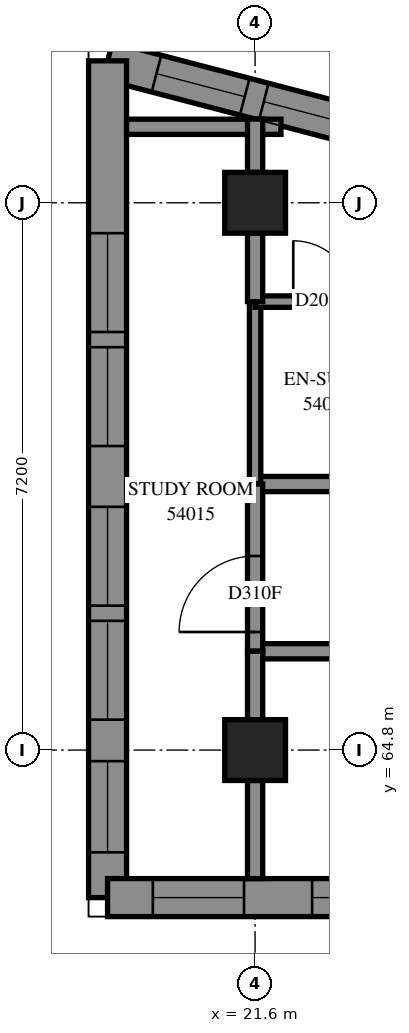
"""IFC4 building model, lengths in metres.
Left out: names, types, materials, properties, quantities, classifications, styles, units other than length and angle.
Written with IfcOpenShell. Run it as: python <this file> out.ifc"""

import sys

from ifc_helpers import new_model, si_unit, direction, frame, frame_2d, origin, origin_2d, place, context, subcontext, project, spatial, polyline, rectangle, outline, extrude, element, fill, save


model = new_model("IFC4")
c1 = context("Model", 3, precision=1e-05, world=origin(), true_north=direction((0.0, 1.0)))
c2 = subcontext(c1, "Body", "Model", "MODEL_VIEW")
j1 = project(units=[si_unit("LENGTHUNIT", "METRE"), si_unit("PLANEANGLEUNIT", "RADIAN")], contexts=[c1])
p1 = place(None, origin())
s1 = spatial("IfcSite", under=j1, at=p1, CompositionType="ELEMENT")
p2 = place(p1, origin())
s2 = spatial("IfcBuilding", under=s1, at=p2, CompositionType="ELEMENT")
p3 = place(p2, frame((0.0, 0.0, 199.8)))
s3 = spatial("IfcBuildingStorey", under=s2, at=p3, CompositionType="ELEMENT", Elevation=199.8)
for number, where, z_axis, x_axis in (
    (1, (21.6, 64.8, 0.0), (0.0, 0.0, 1.0), (1.0, 0.0, 0.0)),
    (2, (21.6, 72.0, 0.0), (0.0, 0.0, 1.0), (1.0, 0.0, 0.0)),
):
    element("IfcColumn", number, at=place(p3, frame(where, z_axis=z_axis, x_axis=x_axis)), inside=s3, PredefinedType="COLUMN", context=c2, shape_type="SweptSolid", body=[
        extrude(rectangle(XDim=0.8, YDim=0.8, at=origin_2d()), origin(), (0.0, 0.0, 1.0), 3.1),
    ])
p4 = place(p3, frame((23.183, 72.947, 0.0), z_axis=(0.0, 0.0, 1.0), x_axis=(-0.9675355908, 0.2527348026, 0.0)))
e3 = element("IfcWall", 3, at=p4, inside=s3, PredefinedType="SOLIDWALL", context=c2, shape_type="SweptSolid", body=[
    extrude(outline(polyline([(0.045, -0.25), (3.966, -0.25), (3.319, 0.25), (-0.045, 0.25), (0.045, -0.25)])), origin(), (0.0, 0.0, 1.0), 3.1),
])
p5 = place(p4, frame((0.318, 0.0, 0.45)))
e4 = element("IfcOpeningElement", 4, at=p5, cuts=e3, PredefinedType="OPENING", context=c2, shape_type="SweptSolid", body=[
    extrude(rectangle(XDim=1.2, YDim=2.5, at=frame_2d((0.6, 1.25))), frame((0.0, 0.26, 0.0), z_axis=(0.0, -1.0, 0.0), x_axis=(1.0, 0.0, 0.0)), (0.0, 0.0, 1.0), 0.52),
])
p6 = place(p4, frame((1.778, 0.0, 0.45)))
e5 = element("IfcOpeningElement", 5, at=p6, cuts=e3, PredefinedType="OPENING", context=c2, shape_type="SweptSolid", body=[
    extrude(rectangle(XDim=1.2, YDim=2.5, at=frame_2d((0.6, 1.25))), frame((0.0, 0.26, 0.0), z_axis=(0.0, -1.0, 0.0), x_axis=(1.0, 0.0, 0.0)), (0.0, 0.0, 1.0), 0.52),
])
p7 = place(p3, frame((19.659, 73.867, 0.0), z_axis=(0.0, 0.0, 1.0), x_axis=(0.0, -1.0, 0.0)))
e6 = element("IfcWall", 6, at=p7, inside=s3, PredefinedType="SOLIDWALL", context=c2, shape_type="SweptSolid", body=[
    extrude(outline(polyline([(-0.324, -0.25), (11.258, -0.25), (10.758, 0.25), (0.324, 0.25), (-0.324, -0.25)])), origin(), (0.0, 0.0, 1.0), 3.1),
])
p8 = place(p7, frame((2.267, 0.0, 0.45)))
e7 = element("IfcOpeningElement", 7, at=p8, cuts=e6, PredefinedType="OPENING", context=c2, shape_type="SweptSolid", body=[
    extrude(rectangle(XDim=1.3, YDim=2.5, at=frame_2d((0.65, 1.25))), frame((0.0, 0.26, 0.0), z_axis=(0.0, -1.0, 0.0), x_axis=(1.0, 0.0, 0.0)), (0.0, 0.0, 1.0), 0.52),
])
p9 = place(p7, frame((3.767, 0.0, 0.45)))
e8 = element("IfcOpeningElement", 8, at=p9, cuts=e6, PredefinedType="OPENING", context=c2, shape_type="SweptSolid", body=[
    extrude(rectangle(XDim=1.3, YDim=2.5, at=frame_2d((0.65, 1.25))), frame((0.0, 0.26, 0.0), z_axis=(0.0, -1.0, 0.0), x_axis=(1.0, 0.0, 0.0)), (0.0, 0.0, 1.0), 0.52),
])
p10 = place(p7, frame((5.867, 0.0, 0.45)))
e9 = element("IfcOpeningElement", 9, at=p10, cuts=e6, PredefinedType="OPENING", context=c2, shape_type="SweptSolid", body=[
    extrude(rectangle(XDim=1.3, YDim=2.5, at=frame_2d((0.65, 1.25))), frame((0.0, 0.26, 0.0), z_axis=(0.0, -1.0, 0.0), x_axis=(1.0, 0.0, 0.0)), (0.0, 0.0, 1.0), 0.52),
])
p11 = place(p7, frame((7.367, 0.0, 0.45)))
e10 = element("IfcOpeningElement", 10, at=p11, cuts=e6, PredefinedType="OPENING", context=c2, shape_type="SweptSolid", body=[
    extrude(rectangle(XDim=1.3, YDim=2.5, at=frame_2d((0.65, 1.25))), frame((0.0, 0.26, 0.0), z_axis=(0.0, -1.0, 0.0), x_axis=(1.0, 0.0, 0.0)), (0.0, 0.0, 1.0), 0.52),
])
p12 = place(p7, frame((9.213, 0.0, 0.45)))
e11 = element("IfcOpeningElement", 11, at=p12, cuts=e6, PredefinedType="OPENING", context=c2, shape_type="SweptSolid", body=[
    extrude(rectangle(XDim=1.2, YDim=2.5, at=frame_2d((0.6, 1.25))), frame((0.0, 0.26, 0.0), z_axis=(0.0, -1.0, 0.0), x_axis=(1.0, 0.0, 0.0)), (0.0, 0.0, 1.0), 0.52),
])
p13 = place(p3, frame((19.659, 62.859, 0.0), z_axis=(0.0, 0.0, 1.0), x_axis=(1.0, 0.0, 0.0)))
e12 = element("IfcWall", 12, at=p13, inside=s3, PredefinedType="SOLIDWALL", context=c2, shape_type="SweptSolid", body=[
    extrude(outline(polyline([(-0.25, -0.25), (15.141, -0.25), (15.641, 0.25), (0.25, 0.25), (-0.25, -0.25)])), origin(), (0.0, 0.0, 1.0), 2.6),
])
p14 = place(p13, frame((2.691, 0.0, 0.6)))
e13 = element("IfcOpeningElement", 13, at=p14, cuts=e12, PredefinedType="OPENING", context=c2, shape_type="SweptSolid", body=[
    extrude(rectangle(XDim=1.8, YDim=1.9, at=frame_2d((0.9, 0.95))), frame((0.0, 0.26, 0.0), z_axis=(0.0, -1.0, 0.0), x_axis=(1.0, 0.0, 0.0)), (0.0, 0.0, 1.0), 0.52),
])
p15 = place(p13, frame((6.441, 0.0, 0.6)))
e14 = element("IfcOpeningElement", 14, at=p15, cuts=e12, PredefinedType="OPENING", context=c2, shape_type="SweptSolid", body=[
    extrude(rectangle(XDim=1.8, YDim=1.9, at=frame_2d((0.9, 0.95))), frame((0.0, 0.26, 0.0), z_axis=(0.0, -1.0, 0.0), x_axis=(1.0, 0.0, 0.0)), (0.0, 0.0, 1.0), 0.52),
])
p16 = place(p13, frame((10.041, 0.0, 0.6)))
e15 = element("IfcOpeningElement", 15, at=p16, cuts=e12, PredefinedType="OPENING", context=c2, shape_type="SweptSolid", body=[
    extrude(rectangle(XDim=1.8, YDim=1.9, at=frame_2d((0.9, 0.95))), frame((0.0, 0.26, 0.0), z_axis=(0.0, -1.0, 0.0), x_axis=(1.0, 0.0, 0.0)), (0.0, 0.0, 1.0), 0.52),
])
p17 = place(p13, frame((13.066, 0.0, 0.6)))
e16 = element("IfcOpeningElement", 16, at=p17, cuts=e12, PredefinedType="OPENING", context=c2, shape_type="SweptSolid", body=[
    extrude(rectangle(XDim=1.8, YDim=1.9, at=frame_2d((0.9, 0.95))), frame((0.0, 0.26, 0.0), z_axis=(0.0, -1.0, 0.0), x_axis=(1.0, 0.0, 0.0)), (0.0, 0.0, 1.0), 0.52),
])
p18 = place(p13, frame((0.596, 0.0, 0.6)))
e17 = element("IfcOpeningElement", 17, at=p18, cuts=e12, PredefinedType="OPENING", context=c2, shape_type="SweptSolid", body=[
    extrude(rectangle(XDim=1.2, YDim=1.9, at=frame_2d((0.6, 0.95))), frame((0.0, 0.26, 0.0), z_axis=(0.0, -1.0, 0.0), x_axis=(1.0, 0.0, 0.0)), (0.0, 0.0, 1.0), 0.52),
])
p19 = place(p3, frame((21.6, 68.3, 0.0), z_axis=(0.0, 0.0, 1.0), x_axis=(1.0, 0.0, 0.0)))
e18 = element("IfcWall", 18, at=p19, inside=s3, PredefinedType="PARTITIONING", context=c2, shape_type="SweptSolid", body=[
    extrude(rectangle(XDim=19.1, YDim=0.2, at=frame_2d((9.55, 0.0))), origin(), (0.0, 0.0, 1.0), 3.1),
])
p20 = place(p19, frame((2.3, 0.0, 0.0)))
e19 = element("IfcOpeningElement", 19, at=p20, cuts=e18, PredefinedType="OPENING", context=c2, shape_type="SweptSolid", body=[
    extrude(rectangle(XDim=0.9, YDim=2.1, at=frame_2d((0.45, 1.05))), frame((0.0, 0.11, 0.0), z_axis=(0.0, -1.0, 0.0), x_axis=(1.0, 0.0, 0.0)), (0.0, 0.0, 1.0), 0.22),
])
p21 = place(p19, frame((5.901, 0.0, 0.0)))
e20 = element("IfcOpeningElement", 20, at=p21, cuts=e18, PredefinedType="OPENING", context=c2, shape_type="SweptSolid", body=[
    extrude(rectangle(XDim=0.9, YDim=2.1, at=frame_2d((0.45, 1.05))), frame((0.0, 0.11, 0.0), z_axis=(0.0, -1.0, 0.0), x_axis=(1.0, 0.0, 0.0)), (0.0, 0.0, 1.0), 0.22),
])
p22 = place(p19, frame((13.139, 0.0, 0.0)))
e21 = element("IfcOpeningElement", 21, at=p22, cuts=e18, PredefinedType="OPENING", context=c2, shape_type="SweptSolid", body=[
    extrude(rectangle(XDim=0.9, YDim=2.1, at=frame_2d((0.45, 1.05))), frame((0.0, 0.11, 0.0), z_axis=(0.0, -1.0, 0.0), x_axis=(1.0, 0.0, 0.0)), (0.0, 0.0, 1.0), 0.22),
])
p23 = place(p3, frame((21.6, 66.1, 0.0), z_axis=(0.0, 0.0, 1.0), x_axis=(1.0, 0.0, 0.0)))
e22 = element("IfcWall", 22, at=p23, inside=s3, PredefinedType="PARTITIONING", context=c2, shape_type="SweptSolid", body=[
    extrude(rectangle(XDim=16.9, YDim=0.2, at=frame_2d((8.45, 0.0))), origin(), (0.0, 0.0, 1.0), 3.1),
])
p24 = place(p23, frame((12.493, 0.0, 0.0)))
e23 = element("IfcOpeningElement", 23, at=p24, cuts=e22, PredefinedType="OPENING", context=c2, shape_type="SweptSolid", body=[
    extrude(rectangle(XDim=1.0, YDim=2.1, at=frame_2d((0.5, 1.05))), frame((0.0, 0.11, 0.0), z_axis=(0.0, -1.0, 0.0), x_axis=(1.0, 0.0, 0.0)), (0.0, 0.0, 1.0), 0.22),
])
p25 = place(p3, frame((21.6, 68.3, 0.0), z_axis=(0.0, 0.0, 1.0), x_axis=(0.0, 1.0, 0.0)))
e24 = element("IfcWall", 24, at=p25, inside=s3, PredefinedType="PARTITIONING", context=c2, shape_type="SweptSolid", body=[
    extrude(rectangle(XDim=2.4, YDim=0.15, at=frame_2d((1.2, 0.0))), origin(), (0.0, 0.0, 1.0), 2.6),
])
p26 = place(p3, frame((21.6, 66.1, 0.0), z_axis=(0.0, 0.0, 1.0), x_axis=(0.0, 1.0, 0.0)))
e25 = element("IfcWall", 25, at=p26, inside=s3, PredefinedType="PARTITIONING", context=c2, shape_type="SweptSolid", body=[
    extrude(rectangle(XDim=2.2, YDim=0.2, at=frame_2d((1.1, 0.0))), origin(), (0.0, 0.0, 1.0), 2.6),
])
p27 = place(p26, frame((0.253, 0.0, 0.0)))
e26 = element("IfcOpeningElement", 26, at=p27, cuts=e25, PredefinedType="OPENING", context=c2, shape_type="SweptSolid", body=[
    extrude(rectangle(XDim=1.0, YDim=2.1, at=frame_2d((0.5, 1.05))), frame((0.0, 0.11, 0.0), z_axis=(0.0, -1.0, 0.0), x_axis=(1.0, 0.0, 0.0)), (0.0, 0.0, 1.0), 0.22),
])
p28 = place(p3, frame((19.909, 73.0, 0.0), z_axis=(0.0, 0.0, 1.0), x_axis=(1.0, 0.0, 0.0)))
e27 = element("IfcWall", 27, at=p28, inside=s3, PredefinedType="PARTITIONING", context=c2, shape_type="SweptSolid", body=[
    extrude(rectangle(XDim=2.031, YDim=0.2, at=frame_2d((1.016, 0.0))), origin(), (0.0, 0.0, 1.0), 3.1),
])
p29 = place(p3, frame((21.6, 70.7, 0.0), z_axis=(0.0, 0.0, 1.0), x_axis=(1.0, 0.0, 0.0)))
e28 = element("IfcWall", 28, at=p29, inside=s3, PredefinedType="PARTITIONING", context=c2, shape_type="SweptSolid", body=[
    extrude(rectangle(XDim=1.9, YDim=0.15, at=frame_2d((0.95, 0.0))), origin(), (0.0, 0.0, 1.0), 3.1),
])
p30 = place(p29, frame((0.502, 0.0, 0.0)))
e29 = element("IfcOpeningElement", 29, at=p30, cuts=e28, PredefinedType="OPENING", context=c2, shape_type="SweptSolid", body=[
    extrude(rectangle(XDim=0.8, YDim=2.1, at=frame_2d((0.4, 1.05))), frame((0.0, 0.085, 0.0), z_axis=(0.0, -1.0, 0.0), x_axis=(1.0, 0.0, 0.0)), (0.0, 0.0, 1.0), 0.17),
])
p31 = place(p3, frame((21.6, 63.109, 0.0), z_axis=(0.0, 0.0, 1.0), x_axis=(0.0, 1.0, 0.0)))
e30 = element("IfcWall", 30, at=p31, inside=s3, PredefinedType="PARTITIONING", context=c2, shape_type="SweptSolid", body=[
    extrude(rectangle(XDim=1.291, YDim=0.2, at=frame_2d((0.645, 0.0))), origin(), (0.0, 0.0, 1.0), 3.1),
])
for number, where, z_axis, x_axis in (
    (31, (21.6, 65.2, 0.0), (0.0, 0.0, 1.0), (0.0, 1.0, 0.0)),
    (32, (21.6, 70.7, 0.0), (0.0, 0.0, 1.0), (0.0, 1.0, 0.0)),
):
    element("IfcWall", number, at=place(p3, frame(where, z_axis=z_axis, x_axis=x_axis)), inside=s3, PredefinedType="PARTITIONING", context=c2, shape_type="SweptSolid", body=[
        extrude(rectangle(XDim=0.9, YDim=0.2, at=frame_2d((0.45, 0.0))), origin(), (0.0, 0.0, 1.0), 2.6),
    ])
p32 = place(p3, frame((21.6, 72.4, 0.0), z_axis=(0.0, 0.0, 1.0), x_axis=(0.0, 1.0, 0.0)))
e33 = element("IfcWall", 33, at=p32, inside=s3, PredefinedType="PARTITIONING", context=c2, shape_type="SweptSolid", body=[
    extrude(rectangle(XDim=0.702, YDim=0.2, at=frame_2d((0.351, 0.0))), origin(), (0.0, 0.0, 1.0), 3.1),
])
p33 = place(p5, origin())
e34 = element("IfcWindow", 34, at=p33, inside=s3, PartitioningType="SINGLE_PANEL", PredefinedType="WINDOW", context=c2, shape_type="SweptSolid", body=[
    extrude(rectangle(XDim=1.2, YDim=2.5, at=frame_2d((0.6, 1.25))), frame((0.0, 0.13, 0.0), z_axis=(0.0, -1.0, 0.0), x_axis=(1.0, 0.0, 0.0)), (0.0, 0.0, 1.0), 0.06),
])
fill(e4, e34)
p34 = place(p6, origin())
e35 = element("IfcWindow", 35, at=p34, inside=s3, PartitioningType="SINGLE_PANEL", PredefinedType="WINDOW", context=c2, shape_type="SweptSolid", body=[
    extrude(rectangle(XDim=1.2, YDim=2.5, at=frame_2d((0.6, 1.25))), frame((0.0, 0.18, 0.0), z_axis=(0.0, -1.0, 0.0), x_axis=(1.0, 0.0, 0.0)), (0.0, 0.0, 1.0), 0.06),
])
fill(e5, e35)
p35 = place(p8, origin())
e36 = element("IfcWindow", 36, at=p35, inside=s3, PartitioningType="SINGLE_PANEL", PredefinedType="WINDOW", context=c2, shape_type="SweptSolid", body=[
    extrude(rectangle(XDim=1.3, YDim=2.5, at=frame_2d((0.65, 1.25))), frame((0.0, 0.18, 0.0), z_axis=(0.0, -1.0, 0.0), x_axis=(1.0, 0.0, 0.0)), (0.0, 0.0, 1.0), 0.06),
])
fill(e7, e36)
p36 = place(p9, origin())
e37 = element("IfcWindow", 37, at=p36, inside=s3, PartitioningType="SINGLE_PANEL", PredefinedType="WINDOW", context=c2, shape_type="SweptSolid", body=[
    extrude(rectangle(XDim=1.3, YDim=2.5, at=frame_2d((0.65, 1.25))), frame((0.0, 0.18, 0.0), z_axis=(0.0, -1.0, 0.0), x_axis=(1.0, 0.0, 0.0)), (0.0, 0.0, 1.0), 0.06),
])
fill(e8, e37)
p37 = place(p10, origin())
e38 = element("IfcWindow", 38, at=p37, inside=s3, PartitioningType="SINGLE_PANEL", PredefinedType="WINDOW", context=c2, shape_type="SweptSolid", body=[
    extrude(rectangle(XDim=1.3, YDim=2.5, at=frame_2d((0.65, 1.25))), frame((0.0, 0.18, 0.0), z_axis=(0.0, -1.0, 0.0), x_axis=(1.0, 0.0, 0.0)), (0.0, 0.0, 1.0), 0.06),
])
fill(e9, e38)
p38 = place(p11, origin())
e39 = element("IfcWindow", 39, at=p38, inside=s3, PartitioningType="SINGLE_PANEL", PredefinedType="WINDOW", context=c2, shape_type="SweptSolid", body=[
    extrude(rectangle(XDim=1.3, YDim=2.5, at=frame_2d((0.65, 1.25))), frame((0.0, 0.18, 0.0), z_axis=(0.0, -1.0, 0.0), x_axis=(1.0, 0.0, 0.0)), (0.0, 0.0, 1.0), 0.06),
])
fill(e10, e39)
p39 = place(p12, origin())
e40 = element("IfcWindow", 40, at=p39, inside=s3, PartitioningType="SINGLE_PANEL", PredefinedType="WINDOW", context=c2, shape_type="SweptSolid", body=[
    extrude(rectangle(XDim=1.2, YDim=2.5, at=frame_2d((0.6, 1.25))), frame((0.0, 0.18, 0.0), z_axis=(0.0, -1.0, 0.0), x_axis=(1.0, 0.0, 0.0)), (0.0, 0.0, 1.0), 0.06),
])
fill(e11, e40)
p40 = place(p14, origin())
e41 = element("IfcWindow", 41, at=p40, inside=s3, PartitioningType="SINGLE_PANEL", PredefinedType="WINDOW", context=c2, shape_type="SweptSolid", body=[
    extrude(rectangle(XDim=1.8, YDim=1.9, at=frame_2d((0.9, 0.95))), frame((0.0, 0.18, 0.0), z_axis=(0.0, -1.0, 0.0), x_axis=(1.0, 0.0, 0.0)), (0.0, 0.0, 1.0), 0.06),
])
fill(e13, e41)
p41 = place(p18, origin())
e42 = element("IfcWindow", 42, at=p41, inside=s3, PartitioningType="SINGLE_PANEL", PredefinedType="WINDOW", context=c2, shape_type="SweptSolid", body=[
    extrude(rectangle(XDim=1.2, YDim=1.9, at=frame_2d((0.6, 0.95))), frame((0.0, 0.18, 0.0), z_axis=(0.0, -1.0, 0.0), x_axis=(1.0, 0.0, 0.0)), (0.0, 0.0, 1.0), 0.06),
])
fill(e17, e42)
p42 = place(p27, origin())
e43 = element("IfcDoor", 43, at=p42, inside=s3, OperationType="SINGLE_SWING_RIGHT", PredefinedType="DOOR", context=c2, shape_type="SweptSolid", body=[
    extrude(rectangle(XDim=1.0, YDim=2.1, at=frame_2d((0.5, 1.05))), frame((0.0, 0.025, 0.0), z_axis=(0.0, -1.0, 0.0), x_axis=(1.0, 0.0, 0.0)), (0.0, 0.0, 1.0), 0.05),
])
fill(e26, e43)
p43 = place(p30, origin())
e44 = element("IfcDoor", 44, at=p43, inside=s3, OperationType="SINGLE_SWING_RIGHT", PredefinedType="DOOR", context=c2, shape_type="SweptSolid", body=[
    extrude(rectangle(XDim=0.8, YDim=2.1, at=frame_2d((0.4, 1.05))), frame((0.0, 0.025, 0.0), z_axis=(0.0, -1.0, 0.0), x_axis=(1.0, 0.0, 0.0)), (0.0, 0.0, 1.0), 0.05),
])
fill(e29, e44)
save(model, sys.argv[1])
